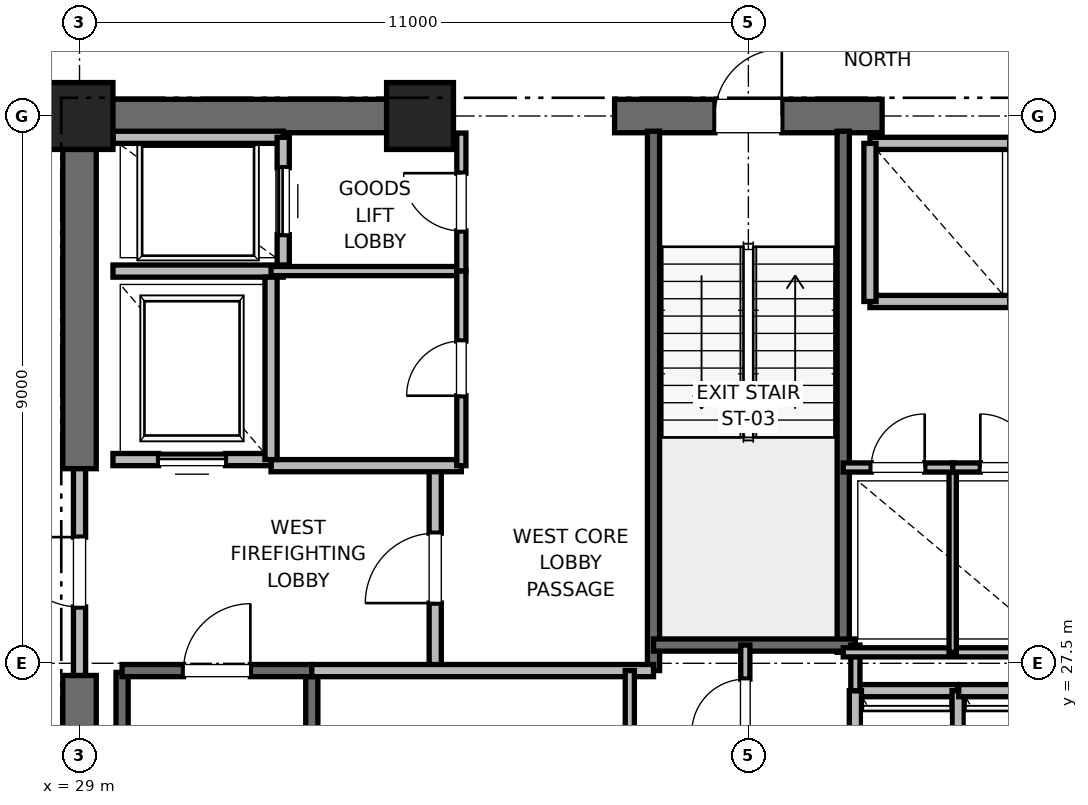
"""IFC4 building model, lengths in metres.
Left out: names, types, materials, properties, quantities, classifications, styles, units other than length and angle.
Written with IfcOpenShell. Run it as: python <this file> out.ifc"""

import sys

from ifc_helpers import new_model, si_unit, direction, frame, frame_2d, origin, origin_2d, place, context, subcontext, project, spatial, rectangle, extrude, element, fill, save


model = new_model("IFC4")
c1 = context("Model", 3, precision=1e-05, world=origin(), true_north=direction((0.0, 1.0)))
c2 = subcontext(c1, "Body", "Model", "MODEL_VIEW")
j1 = project(units=[si_unit("LENGTHUNIT", "METRE"), si_unit("PLANEANGLEUNIT", "RADIAN")], contexts=[c1])
p1 = place(None, origin())
s1 = spatial("IfcSite", under=j1, at=p1, CompositionType="ELEMENT")
p2 = place(p1, origin())
s2 = spatial("IfcBuilding", under=s1, at=p2, CompositionType="ELEMENT")
p3 = place(p2, frame((0.0, 0.0, 144.4)))
s3 = spatial("IfcBuildingStorey", under=s2, at=p3, CompositionType="ELEMENT", Elevation=144.4)
for number, where, z_axis, x_axis in (
    (1, (29.0, 36.5, 0.0), (0.0, 0.0, 1.0), (1.0, 0.0, 0.0)),
    (2, (34.6, 36.5, 0.0), (0.0, 0.0, 1.0), (1.0, 0.0, 0.0)),
):
    element("IfcColumn", number, at=place(p3, frame(where, z_axis=z_axis, x_axis=x_axis)), inside=s3, PredefinedType="PILASTER", context=c2, shape_type="SweptSolid", body=[
        extrude(rectangle(XDim=1.1, YDim=1.1, at=origin_2d()), origin(), (0.0, 0.0, 1.0), 4.0),
    ])
p4 = place(p3, frame((29.0, 36.5, 0.0), z_axis=(0.0, 0.0, 1.0), x_axis=(1.0, 0.0, 0.0)))
e3 = element("IfcWall", 3, at=p4, inside=s3, PredefinedType="SHEAR", context=c2, shape_type="SweptSolid", body=[
    extrude(rectangle(XDim=5.8, YDim=0.55, at=frame_2d((2.9, 0.0))), origin(), (0.0, 0.0, 1.0), 3.775),
])
p5 = place(p3, frame((37.8, 36.5, 0.0), z_axis=(0.0, 0.0, 1.0), x_axis=(1.0, 0.0, 0.0)))
e4 = element("IfcWall", 4, at=p5, inside=s3, PredefinedType="SHEAR", context=c2, shape_type="SweptSolid", body=[
    extrude(rectangle(XDim=4.4, YDim=0.55, at=frame_2d((2.2, 0.0))), origin(), (0.0, 0.0, 1.0), 3.775),
])
p6 = place(p5, frame((1.65, 0.0, 0.0)))
e5 = element("IfcOpeningElement", 5, at=p6, cuts=e4, PredefinedType="OPENING", context=c2, shape_type="SweptSolid", body=[
    extrude(rectangle(XDim=1.1, YDim=2.15, at=frame_2d((0.55, 1.075))), frame((0.0, 0.275, 0.0), z_axis=(0.0, -1.0, 0.0), x_axis=(1.0, 0.0, 0.0)), (0.0, 0.0, 1.0), 0.55),
])
p7 = place(p3, frame((29.0, 18.5, 0.0), z_axis=(0.0, 0.0, 1.0), x_axis=(0.0, 1.0, 0.0)))
e6 = element("IfcWall", 6, at=p7, inside=s3, PredefinedType="SHEAR", context=c2, shape_type="SweptSolid", body=[
    extrude(rectangle(XDim=8.8, YDim=0.55, at=frame_2d((4.4, 0.0))), origin(), (0.0, 0.0, 1.0), 3.775),
])
p8 = place(p3, frame((29.0, 30.7, 0.0), z_axis=(0.0, 0.0, 1.0), x_axis=(0.0, 1.0, 0.0)))
e7 = element("IfcWall", 7, at=p8, inside=s3, PredefinedType="SHEAR", context=c2, shape_type="SweptSolid", body=[
    extrude(rectangle(XDim=5.8, YDim=0.55, at=frame_2d((2.9, 0.0))), origin(), (0.0, 0.0, 1.0), 3.775),
])
p9 = place(p3, frame((29.7, 19.2, 0.0), z_axis=(0.0, 0.0, 1.0), x_axis=(0.0, 1.0, 0.0)))
e8 = element("IfcWall", 8, at=p9, inside=s3, PredefinedType="SOLIDWALL", context=c2, shape_type="SweptSolid", body=[
    extrude(rectangle(XDim=8.15, YDim=0.2, at=frame_2d((4.075, 0.0))), origin(), (0.0, 0.0, 1.0), 3.775),
])
p10 = place(p3, frame((32.82, 18.6, 0.0), z_axis=(0.0, 0.0, 1.0), x_axis=(0.0, 1.0, 0.0)))
e9 = element("IfcWall", 9, at=p10, inside=s3, PredefinedType="SOLIDWALL", context=c2, shape_type="SweptSolid", body=[
    extrude(rectangle(XDim=8.78, YDim=0.2, at=frame_2d((4.39, 0.0))), origin(), (0.0, 0.0, 1.0), 3.775),
])
p11 = place(p3, frame((29.7, 27.38, 0.0), z_axis=(0.0, 0.0, 1.0), x_axis=(1.0, 0.0, 0.0)))
e10 = element("IfcWall", 10, at=p11, inside=s3, PredefinedType="SOLIDWALL", context=c2, shape_type="SweptSolid", body=[
    extrude(rectangle(XDim=3.12, YDim=0.2, at=frame_2d((1.56, 0.0))), origin(), (0.0, 0.0, 1.0), 3.775),
])
p12 = place(p11, frame((1.01, 0.0, 0.0)))
e11 = element("IfcOpeningElement", 11, at=p12, cuts=e10, PredefinedType="OPENING", context=c2, shape_type="SweptSolid", body=[
    extrude(rectangle(XDim=1.1, YDim=2.15, at=frame_2d((0.55, 1.075))), frame((0.0, 0.1, 0.0), z_axis=(0.0, -1.0, 0.0), x_axis=(1.0, 0.0, 0.0)), (0.0, 0.0, 1.0), 0.2),
])
p13 = place(p3, frame((38.44, 27.38, 0.0), z_axis=(0.0, 0.0, 1.0), x_axis=(0.0, 1.0, 0.0)))
e12 = element("IfcWall", 12, at=p13, inside=s3, PredefinedType="SOLIDWALL", context=c2, shape_type="SweptSolid", body=[
    extrude(rectangle(XDim=8.87, YDim=0.2, at=frame_2d((4.435, 0.0))), origin(), (0.0, 0.0, 1.0), 3.775),
])
p14 = place(p3, frame((41.56, 27.68, 0.0), z_axis=(0.0, 0.0, 1.0), x_axis=(0.0, 1.0, 0.0)))
e13 = element("IfcWall", 13, at=p14, inside=s3, PredefinedType="SOLIDWALL", context=c2, shape_type="SweptSolid", body=[
    extrude(rectangle(XDim=8.57, YDim=0.2, at=frame_2d((4.285, 0.0))), origin(), (0.0, 0.0, 1.0), 3.775),
])
p15 = place(p3, frame((38.44, 27.8, 0.0), z_axis=(0.0, 0.0, 1.0), x_axis=(1.0, 0.0, 0.0)))
e14 = element("IfcWall", 14, at=p15, inside=s3, PredefinedType="SOLIDWALL", context=c2, shape_type="SweptSolid", body=[
    extrude(rectangle(XDim=3.32, YDim=0.2, at=frame_2d((1.66, 0.0))), origin(), (0.0, 0.0, 1.0), 3.775),
])
p16 = place(p3, frame((34.85, 27.38, 0.0), z_axis=(0.0, 0.0, 1.0), x_axis=(0.0, 1.0, 0.0)))
e15 = element("IfcWall", 15, at=p16, inside=s3, PredefinedType="PARTITIONING", context=c2, shape_type="SweptSolid", body=[
    extrude(rectangle(XDim=3.37, YDim=0.2, at=frame_2d((1.685, 0.0))), origin(), (0.0, 0.0, 1.0), 3.775),
])
p17 = place(p16, frame((1.11, 0.0, 0.0)))
e16 = element("IfcOpeningElement", 16, at=p17, cuts=e15, PredefinedType="OPENING", context=c2, shape_type="SweptSolid", body=[
    extrude(rectangle(XDim=1.15, YDim=2.2, at=frame_2d((0.575, 1.1))), frame((0.0, 0.1, 0.0), z_axis=(0.0, -1.0, 0.0), x_axis=(1.0, 0.0, 0.0)), (0.0, 0.0, 1.0), 0.2),
])
p18 = place(p3, frame((29.0, 27.3, 0.0), z_axis=(0.0, 0.0, 1.0), x_axis=(0.0, 1.0, 0.0)))
e17 = element("IfcWall", 17, at=p18, inside=s3, PredefinedType="PARTITIONING", context=c2, shape_type="SweptSolid", body=[
    extrude(rectangle(XDim=3.4, YDim=0.2, at=frame_2d((1.7, 0.0))), origin(), (0.0, 0.0, 1.0), 2.755),
])
p19 = place(p18, frame((1.125, 0.0, 0.0)))
e18 = element("IfcOpeningElement", 18, at=p19, cuts=e17, PredefinedType="OPENING", context=c2, shape_type="SweptSolid", body=[
    extrude(rectangle(XDim=1.15, YDim=2.2, at=frame_2d((0.575, 1.1))), frame((0.0, 0.1, 0.0), z_axis=(0.0, -1.0, 0.0), x_axis=(1.0, 0.0, 0.0)), (0.0, 0.0, 1.0), 0.2),
])
p20 = place(p3, frame((32.82, 27.38, 0.0), z_axis=(0.0, 0.0, 1.0), x_axis=(1.0, 0.0, 0.0)))
e19 = element("IfcWall", 19, at=p20, inside=s3, PredefinedType="PARTITIONING", context=c2, shape_type="SweptSolid", body=[
    extrude(rectangle(XDim=5.62, YDim=0.2, at=frame_2d((2.81, 0.0))), origin(), (0.0, 0.0, 1.0), 3.775),
])
p21 = place(p3, frame((32.15, 30.75, 0.0), z_axis=(0.0, 0.0, 1.0), x_axis=(1.0, 0.0, 0.0)))
e20 = element("IfcWall", 20, at=p21, inside=s3, PredefinedType="PARTITIONING", context=c2, shape_type="SweptSolid", body=[
    extrude(rectangle(XDim=3.13, YDim=0.2, at=frame_2d((1.565, 0.0))), origin(), (0.0, 0.0, 1.0), 3.775),
])
p22 = place(p3, frame((29.55, 30.85, 0.0), z_axis=(0.0, 0.0, 1.0), x_axis=(1.0, 0.0, 0.0)))
e21 = element("IfcWall", 21, at=p22, inside=s3, PredefinedType="SOLIDWALL", context=c2, shape_type="SweptSolid", body=[
    extrude(rectangle(XDim=2.6, YDim=0.2, at=frame_2d((1.3, 0.0))), origin(), (0.0, 0.0, 1.0), 2.755),
])
p23 = place(p22, frame((0.75, 0.0, 0.0)))
e22 = element("IfcOpeningElement", 22, at=p23, cuts=e21, PredefinedType="OPENING", context=c2, shape_type="SweptSolid", body=[
    extrude(rectangle(XDim=1.1, YDim=2.2, at=frame_2d((0.55, 1.1))), frame((0.0, 0.1, 0.0), z_axis=(0.0, -1.0, 0.0), x_axis=(1.0, 0.0, 0.0)), (0.0, 0.0, 1.0), 0.2),
])
p24 = place(p3, frame((29.55, 33.95, 0.0), z_axis=(0.0, 0.0, 1.0), x_axis=(1.0, 0.0, 0.0)))
e23 = element("IfcWall", 23, at=p24, inside=s3, PredefinedType="SOLIDWALL", context=c2, shape_type="SweptSolid", body=[
    extrude(rectangle(XDim=2.8, YDim=0.2, at=frame_2d((1.4, 0.0))), origin(), (0.0, 0.0, 1.0), 3.775),
])
p25 = place(p3, frame((32.15, 30.85, 0.0), z_axis=(0.0, 0.0, 1.0), x_axis=(0.0, 1.0, 0.0)))
e24 = element("IfcWall", 24, at=p25, inside=s3, PredefinedType="SOLIDWALL", context=c2, shape_type="SweptSolid", body=[
    extrude(rectangle(XDim=3.0, YDim=0.2, at=frame_2d((1.5, 0.0))), origin(), (0.0, 0.0, 1.0), 3.775),
])
p26 = place(p3, frame((32.35, 36.15, 0.0), z_axis=(0.0, 0.0, 1.0), x_axis=(-1.0, 0.0, 0.0)))
e25 = element("IfcWall", 25, at=p26, inside=s3, PredefinedType="SOLIDWALL", context=c2, shape_type="SweptSolid", body=[
    extrude(rectangle(XDim=2.8, YDim=0.2, at=frame_2d((1.4, 0.0))), origin(), (0.0, 0.0, 1.0), 2.985),
])
p27 = place(p3, frame((32.35, 34.05, 0.0), z_axis=(0.0, 0.0, 1.0), x_axis=(0.0, 1.0, 0.0)))
e26 = element("IfcWall", 26, at=p27, inside=s3, PredefinedType="SOLIDWALL", context=c2, shape_type="SweptSolid", body=[
    extrude(rectangle(XDim=2.1, YDim=0.2, at=frame_2d((1.05, 0.0))), origin(), (0.0, 0.0, 1.0), 3.775),
])
p28 = place(p27, frame((0.5, 0.0, 0.0)))
e27 = element("IfcOpeningElement", 27, at=p28, cuts=e26, PredefinedType="OPENING", context=c2, shape_type="SweptSolid", body=[
    extrude(rectangle(XDim=1.1, YDim=2.2, at=frame_2d((0.55, 1.1))), frame((0.0, 0.1, 0.0), z_axis=(0.0, -1.0, 0.0), x_axis=(1.0, 0.0, 0.0)), (0.0, 0.0, 1.0), 0.2),
])
p29 = place(p3, frame((43.44, 27.05, 0.0), z_axis=(0.0, 0.0, 1.0), x_axis=(-1.0, 0.0, 0.0)))
e28 = element("IfcWall", 28, at=p29, inside=s3, PredefinedType="SOLIDWALL", context=c2, shape_type="SweptSolid", body=[
    extrude(rectangle(XDim=1.68, YDim=0.2, at=frame_2d((0.84, 0.0))), origin(), (0.0, 0.0, 1.0), 3.775),
])
for number, where, z_axis, x_axis in (
    (29, (41.76, 27.05, 0.0), (0.0, 0.0, 1.0), (0.0, -1.0, 0.0)),
    (30, (43.45, 24.45, 0.0), (0.0, 0.0, 1.0), (0.0, 1.0, 0.0)),
):
    element("IfcWall", number, at=place(p3, frame(where, z_axis=z_axis, x_axis=x_axis)), inside=s3, PredefinedType="SOLIDWALL", context=c2, shape_type="SweptSolid", body=[
        extrude(rectangle(XDim=2.6, YDim=0.2, at=frame_2d((1.3, 0.0))), origin(), (0.0, 0.0, 1.0), 3.775),
    ])
p30 = place(p3, frame((45.12, 27.05, 0.0), z_axis=(0.0, 0.0, 1.0), x_axis=(-1.0, 0.0, 0.0)))
e31 = element("IfcWall", 31, at=p30, inside=s3, PredefinedType="SOLIDWALL", context=c2, shape_type="SweptSolid", body=[
    extrude(rectangle(XDim=1.66, YDim=0.2, at=frame_2d((0.83, 0.0))), origin(), (0.0, 0.0, 1.0), 3.775),
])
p31 = place(p3, frame((42.0, 33.45, 0.0), z_axis=(0.0, 0.0, 1.0), x_axis=(1.0, 0.0, 0.0)))
e32 = element("IfcWall", 32, at=p31, inside=s3, PredefinedType="SOLIDWALL", context=c2, shape_type="SweptSolid", body=[
    extrude(rectangle(XDim=2.3, YDim=0.2, at=frame_2d((1.15, 0.0))), origin(), (0.0, 0.0, 1.0), 3.775),
])
p32 = place(p3, frame((44.3, 36.05, 0.0), z_axis=(0.0, 0.0, 1.0), x_axis=(-1.0, 0.0, 0.0)))
e33 = element("IfcWall", 33, at=p32, inside=s3, PredefinedType="SOLIDWALL", context=c2, shape_type="SweptSolid", body=[
    extrude(rectangle(XDim=2.3, YDim=0.2, at=frame_2d((1.15, 0.0))), origin(), (0.0, 0.0, 1.0), 2.755),
])
p33 = place(p3, frame((42.0, 36.05, 0.0), z_axis=(0.0, 0.0, 1.0), x_axis=(0.0, -1.0, 0.0)))
e34 = element("IfcWall", 34, at=p33, inside=s3, PredefinedType="SOLIDWALL", context=c2, shape_type="SweptSolid", body=[
    extrude(rectangle(XDim=2.6, YDim=0.2, at=frame_2d((1.3, 0.0))), origin(), (0.0, 0.0, 1.0), 2.755),
])
p34 = place(p3, frame((41.76, 27.05, 0.0), z_axis=(0.0, 0.0, 1.0), x_axis=(0.0, 1.0, 0.0)))
e35 = element("IfcWall", 35, at=p34, inside=s3, PredefinedType="PARTITIONING", context=c2, shape_type="SweptSolid", body=[
    extrude(rectangle(XDim=0.75, YDim=0.15, at=frame_2d((0.375, 0.0))), origin(), (0.0, 0.0, 1.0), 2.85),
])
p35 = place(p3, frame((39.95, 25.8, 0.0), z_axis=(0.0, 0.0, 1.0), x_axis=(0.0, 1.0, 0.0)))
e36 = element("IfcWall", 36, at=p35, inside=s3, PredefinedType="PARTITIONING", context=c2, shape_type="SweptSolid", body=[
    extrude(rectangle(XDim=2.0, YDim=0.15, at=frame_2d((1.0, 0.0))), origin(), (0.0, 0.0, 1.0), 2.85),
])
p36 = place(p35, frame((0.56, 0.0, 0.0)))
e37 = element("IfcOpeningElement", 37, at=p36, cuts=e36, PredefinedType="OPENING", context=c2, shape_type="SweptSolid", body=[
    extrude(rectangle(XDim=0.88, YDim=2.1, at=frame_2d((0.44, 1.05))), frame((0.0, 0.075, 0.0), z_axis=(0.0, -1.0, 0.0), x_axis=(1.0, 0.0, 0.0)), (0.0, 0.0, 1.0), 0.15),
])
p37 = place(p3, frame((32.15, 33.95, 0.0), z_axis=(0.0, 0.0, 1.0), x_axis=(1.0, 0.0, 0.0)))
e38 = element("IfcWall", 38, at=p37, inside=s3, PredefinedType="PARTITIONING", context=c2, shape_type="SweptSolid", body=[
    extrude(rectangle(XDim=3.13, YDim=0.15, at=frame_2d((1.565, 0.0))), origin(), (0.0, 0.0, 1.0), 2.85),
])
p38 = place(p3, frame((35.28, 33.95, 0.0), z_axis=(0.0, 0.0, 1.0), x_axis=(0.0, 1.0, 0.0)))
e39 = element("IfcWall", 39, at=p38, inside=s3, PredefinedType="PARTITIONING", context=c2, shape_type="SweptSolid", body=[
    extrude(rectangle(XDim=2.27, YDim=0.15, at=frame_2d((1.135, 0.0))), origin(), (0.0, 0.0, 1.0), 2.755),
])
p39 = place(p38, frame((0.66, 0.0, 0.0)))
e40 = element("IfcOpeningElement", 40, at=p39, cuts=e39, PredefinedType="OPENING", context=c2, shape_type="SweptSolid", body=[
    extrude(rectangle(XDim=0.95, YDim=2.15, at=frame_2d((0.475, 1.075))), frame((0.0, 0.075, 0.0), z_axis=(0.0, -1.0, 0.0), x_axis=(1.0, 0.0, 0.0)), (0.0, 0.0, 1.0), 0.15),
])
p40 = place(p3, frame((35.28, 30.75, 0.0), z_axis=(0.0, 0.0, 1.0), x_axis=(0.0, 1.0, 0.0)))
e41 = element("IfcWall", 41, at=p40, inside=s3, PredefinedType="PARTITIONING", context=c2, shape_type="SweptSolid", body=[
    extrude(rectangle(XDim=3.2, YDim=0.15, at=frame_2d((1.6, 0.0))), origin(), (0.0, 0.0, 1.0), 2.85),
])
p41 = place(p40, frame((1.15, 0.0, 0.0)))
e42 = element("IfcOpeningElement", 42, at=p41, cuts=e41, PredefinedType="OPENING", context=c2, shape_type="SweptSolid", body=[
    extrude(rectangle(XDim=0.9, YDim=2.1, at=frame_2d((0.45, 1.05))), frame((0.0, 0.075, 0.0), z_axis=(0.0, -1.0, 0.0), x_axis=(1.0, 0.0, 0.0)), (0.0, 0.0, 1.0), 0.15),
])
p42 = place(p3, frame((38.05, 23.06, 0.0), z_axis=(0.0, 0.0, 1.0), x_axis=(0.0, 1.0, 0.0)))
e43 = element("IfcWall", 43, at=p42, inside=s3, PredefinedType="PARTITIONING", context=c2, shape_type="SweptSolid", body=[
    extrude(rectangle(XDim=4.32, YDim=0.15, at=frame_2d((2.16, 0.0))), origin(), (0.0, 0.0, 1.0), 2.85),
])
p43 = place(p42, frame((1.66, 0.0, 0.0)))
e44 = element("IfcOpeningElement", 44, at=p43, cuts=e43, PredefinedType="OPENING", context=c2, shape_type="SweptSolid", body=[
    extrude(rectangle(XDim=1.0, YDim=2.15, at=frame_2d((0.5, 1.075))), frame((0.0, 0.075, 0.0), z_axis=(0.0, -1.0, 0.0), x_axis=(1.0, 0.0, 0.0)), (0.0, 0.0, 1.0), 0.15),
])
p44 = place(p3, frame((41.56, 27.68, 0.0), z_axis=(0.0, 0.0, 1.0), x_axis=(1.0, 0.0, 0.0)))
e45 = element("IfcWall", 45, at=p44, inside=s3, PredefinedType="PARTITIONING", context=c2, shape_type="SweptSolid", body=[
    extrude(rectangle(XDim=3.59, YDim=0.15, at=frame_2d((1.795, 0.0))), origin(), (0.0, 0.0, 1.0), 2.85),
])
p45 = place(p3, frame((43.36, 27.68, 0.0), z_axis=(0.0, 0.0, 1.0), x_axis=(0.0, 1.0, 0.0)))
e46 = element("IfcWall", 46, at=p45, inside=s3, PredefinedType="PARTITIONING", context=c2, shape_type="SweptSolid", body=[
    extrude(rectangle(XDim=3.04, YDim=0.12, at=frame_2d((1.52, 0.0))), origin(), (0.0, 0.0, 1.0), 2.85),
])
p46 = place(p3, frame((41.56, 30.72, 0.0), z_axis=(0.0, 0.0, 1.0), x_axis=(1.0, 0.0, 0.0)))
e47 = element("IfcWall", 47, at=p46, inside=s3, PredefinedType="PARTITIONING", context=c2, shape_type="SweptSolid", body=[
    extrude(rectangle(XDim=1.8, YDim=0.15, at=frame_2d((0.9, 0.0))), origin(), (0.0, 0.0, 1.0), 2.85),
])
p47 = place(p46, frame((0.46, 0.0, 0.0)))
e48 = element("IfcOpeningElement", 48, at=p47, cuts=e47, PredefinedType="OPENING", context=c2, shape_type="SweptSolid", body=[
    extrude(rectangle(XDim=0.88, YDim=2.1, at=frame_2d((0.44, 1.05))), frame((0.0, 0.075, 0.0), z_axis=(0.0, -1.0, 0.0), x_axis=(1.0, 0.0, 0.0)), (0.0, 0.0, 1.0), 0.15),
])
p48 = place(p3, frame((43.36, 30.72, 0.0), z_axis=(0.0, 0.0, 1.0), x_axis=(1.0, 0.0, 0.0)))
e49 = element("IfcWall", 49, at=p48, inside=s3, PredefinedType="PARTITIONING", context=c2, shape_type="SweptSolid", body=[
    extrude(rectangle(XDim=1.79, YDim=0.15, at=frame_2d((0.895, 0.0))), origin(), (0.0, 0.0, 1.0), 2.85),
])
p49 = place(p48, frame((0.455, 0.0, 0.0)))
e50 = element("IfcOpeningElement", 50, at=p49, cuts=e49, PredefinedType="OPENING", context=c2, shape_type="SweptSolid", body=[
    extrude(rectangle(XDim=0.88, YDim=2.1, at=frame_2d((0.44, 1.05))), frame((0.0, 0.075, 0.0), z_axis=(0.0, -1.0, 0.0), x_axis=(1.0, 0.0, 0.0)), (0.0, 0.0, 1.0), 0.15),
])
p50 = place(p12, origin())
e51 = element("IfcDoor", 51, at=p50, inside=s3, OperationType="SINGLE_SWING_RIGHT", PredefinedType="DOOR", context=c2, shape_type="SweptSolid", body=[
    extrude(rectangle(XDim=1.1, YDim=2.15, at=frame_2d((0.55, 1.075))), frame((0.0, 0.025, 0.0), z_axis=(0.0, -1.0, 0.0), x_axis=(1.0, 0.0, 0.0)), (0.0, 0.0, 1.0), 0.05),
])
fill(e11, e51)
p51 = place(p6, origin())
e52 = element("IfcDoor", 52, at=p51, inside=s3, OperationType="SINGLE_SWING_RIGHT", PredefinedType="DOOR", context=c2, shape_type="SweptSolid", body=[
    extrude(rectangle(XDim=1.1, YDim=2.15, at=frame_2d((0.55, 1.075))), frame((0.0, 0.025, 0.0), z_axis=(0.0, -1.0, 0.0), x_axis=(1.0, 0.0, 0.0)), (0.0, 0.0, 1.0), 0.05),
])
fill(e5, e52)
p52 = place(p17, origin())
e53 = element("IfcDoor", 53, at=p52, inside=s3, OperationType="SINGLE_SWING_LEFT", PredefinedType="DOOR", context=c2, shape_type="SweptSolid", body=[
    extrude(rectangle(XDim=1.15, YDim=2.2, at=frame_2d((0.575, 1.1))), frame((0.0, 0.025, 0.0), z_axis=(0.0, -1.0, 0.0), x_axis=(1.0, 0.0, 0.0)), (0.0, 0.0, 1.0), 0.05),
])
fill(e16, e53)
p53 = place(p19, origin())
e54 = element("IfcDoor", 54, at=p53, inside=s3, OperationType="SINGLE_SWING_RIGHT", PredefinedType="DOOR", context=c2, shape_type="SweptSolid", body=[
    extrude(rectangle(XDim=1.15, YDim=2.2, at=frame_2d((0.575, 1.1))), frame((0.0, 0.025, 0.0), z_axis=(0.0, -1.0, 0.0), x_axis=(1.0, 0.0, 0.0)), (0.0, 0.0, 1.0), 0.05),
])
fill(e18, e54)
p54 = place(p23, origin())
e55 = element("IfcDoor", 55, at=p54, inside=s3, OperationType="SLIDING_TO_RIGHT", PredefinedType="DOOR", context=c2, shape_type="SweptSolid", body=[
    extrude(rectangle(XDim=1.1, YDim=2.2, at=frame_2d((0.55, 1.1))), frame((0.0, 0.025, 0.0), z_axis=(0.0, -1.0, 0.0), x_axis=(1.0, 0.0, 0.0)), (0.0, 0.0, 1.0), 0.05),
])
fill(e22, e55)
p55 = place(p28, origin())
e56 = element("IfcDoor", 56, at=p55, inside=s3, OperationType="SLIDING_TO_RIGHT", PredefinedType="DOOR", context=c2, shape_type="SweptSolid", body=[
    extrude(rectangle(XDim=1.1, YDim=2.2, at=frame_2d((0.55, 1.1))), frame((0.0, 0.025, 0.0), z_axis=(0.0, -1.0, 0.0), x_axis=(1.0, 0.0, 0.0)), (0.0, 0.0, 1.0), 0.05),
])
fill(e27, e56)
p56 = place(p36, origin())
e57 = element("IfcDoor", 57, at=p56, inside=s3, OperationType="SINGLE_SWING_LEFT", PredefinedType="DOOR", context=c2, shape_type="SweptSolid", body=[
    extrude(rectangle(XDim=0.88, YDim=2.1, at=frame_2d((0.44, 1.05))), frame((0.0, 0.025, 0.0), z_axis=(0.0, -1.0, 0.0), x_axis=(1.0, 0.0, 0.0)), (0.0, 0.0, 1.0), 0.05),
])
fill(e37, e57)
p57 = place(p39, origin())
e58 = element("IfcDoor", 58, at=p57, inside=s3, OperationType="SINGLE_SWING_RIGHT", PredefinedType="DOOR", context=c2, shape_type="SweptSolid", body=[
    extrude(rectangle(XDim=0.95, YDim=2.15, at=frame_2d((0.475, 1.075))), frame((0.0, 0.025, 0.0), z_axis=(0.0, -1.0, 0.0), x_axis=(1.0, 0.0, 0.0)), (0.0, 0.0, 1.0), 0.05),
])
fill(e40, e58)
p58 = place(p41, origin())
e59 = element("IfcDoor", 59, at=p58, inside=s3, OperationType="SINGLE_SWING_LEFT", PredefinedType="DOOR", context=c2, shape_type="SweptSolid", body=[
    extrude(rectangle(XDim=0.9, YDim=2.1, at=frame_2d((0.45, 1.05))), frame((0.0, 0.025, 0.0), z_axis=(0.0, -1.0, 0.0), x_axis=(1.0, 0.0, 0.0)), (0.0, 0.0, 1.0), 0.05),
])
fill(e42, e59)
p59 = place(p47, origin())
e60 = element("IfcDoor", 60, at=p59, inside=s3, OperationType="SINGLE_SWING_RIGHT", PredefinedType="DOOR", context=c2, shape_type="SweptSolid", body=[
    extrude(rectangle(XDim=0.88, YDim=2.1, at=frame_2d((0.44, 1.05))), frame((0.0, 0.025, 0.0), z_axis=(0.0, -1.0, 0.0), x_axis=(1.0, 0.0, 0.0)), (0.0, 0.0, 1.0), 0.05),
])
fill(e48, e60)
p60 = place(p49, origin())
e61 = element("IfcDoor", 61, at=p60, inside=s3, OperationType="SINGLE_SWING_LEFT", PredefinedType="DOOR", context=c2, shape_type="SweptSolid", body=[
    extrude(rectangle(XDim=0.88, YDim=2.1, at=frame_2d((0.44, 1.05))), frame((0.0, 0.025, 0.0), z_axis=(0.0, -1.0, 0.0), x_axis=(1.0, 0.0, 0.0)), (0.0, 0.0, 1.0), 0.05),
])
fill(e50, e61)
save(model, sys.argv[1])
